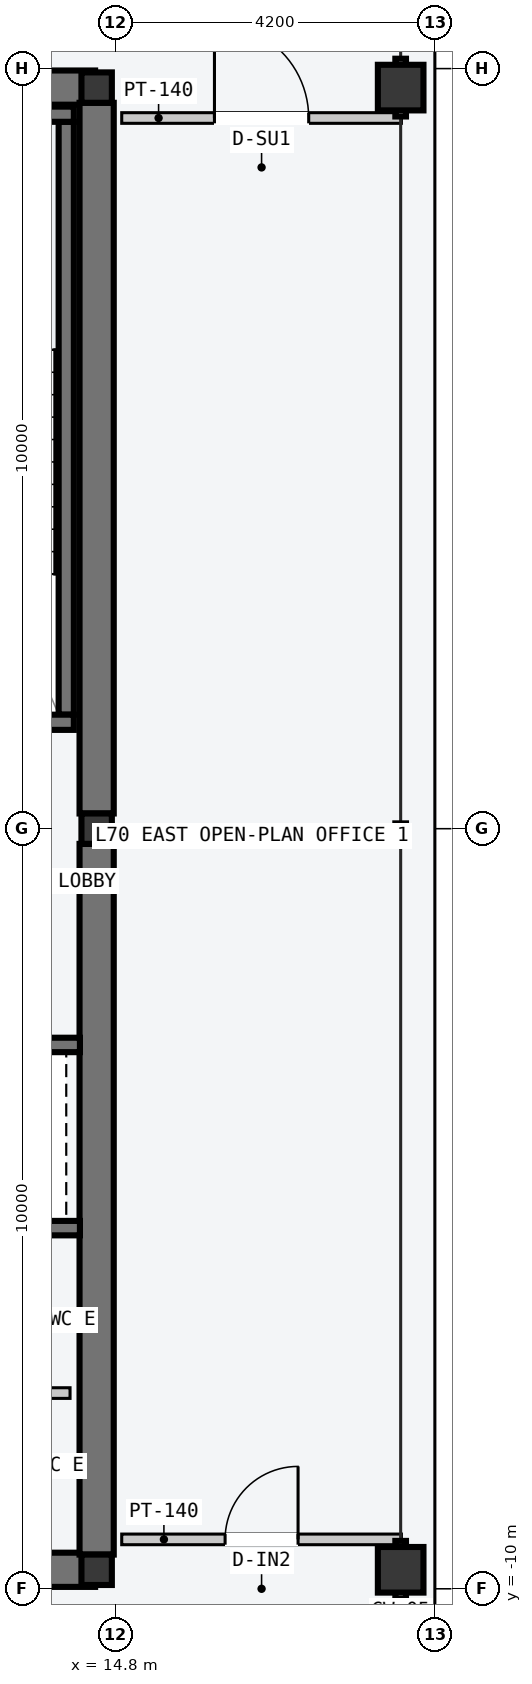
"""IFC4 building model, lengths in metres.
Left out: names, types, materials, properties, quantities, classifications, styles, units other than length and angle.
Written with IfcOpenShell. Run it as: python <this file> out.ifc"""

import sys

from ifc_helpers import new_model, si_unit, direction, frame, frame_2d, origin, origin_2d, place, context, subcontext, project, spatial, rectangle, hollow_rectangle, i_section, extrude, element, fill, save


model = new_model("IFC4")
c1 = context("Model", 3, precision=1e-05, world=origin(), true_north=direction((0.0, 1.0)))
c2 = subcontext(c1, "Body", "Model", "MODEL_VIEW")
j1 = project(units=[si_unit("LENGTHUNIT", "METRE"), si_unit("PLANEANGLEUNIT", "RADIAN")], contexts=[c1])
p1 = place(None, origin())
s1 = spatial("IfcSite", under=j1, at=p1, CompositionType="ELEMENT")
p2 = place(p1, origin())
s2 = spatial("IfcBuilding", under=s1, at=p2, CompositionType="ELEMENT")
p3 = place(p2, frame((0.0, 0.0, 265.2)))
s3 = spatial("IfcBuildingStorey", under=s2, at=p3, CompositionType="ELEMENT", Elevation=265.2)
for number, where, z_axis, x_axis in (
    (1, (8.07, -9.75, -0.2), (0.0, 0.0, 1.0), (1.0, 0.0, 0.0)),
    (2, (8.07, 9.75, -0.2), (0.0, 0.0, 1.0), (1.0, 0.0, 0.0)),
):
    element("IfcWall", number, at=place(p3, frame(where, z_axis=z_axis, x_axis=x_axis)), inside=s3, PredefinedType="SHEAR", context=c2, shape_type="SweptSolid", body=[
        extrude(rectangle(XDim=6.46, YDim=0.45, at=frame_2d((3.23, 0.0))), origin(), (0.0, 0.0, 1.0), 3.6),
    ])
for number, where, z_axis, x_axis in (
    (3, (14.55, -9.55, -0.2), (0.0, 0.0, 1.0), (0.0, 1.0, 0.0)),
    (4, (14.55, 0.2, -0.2), (0.0, 0.0, 1.0), (0.0, 1.0, 0.0)),
):
    element("IfcWall", number, at=place(p3, frame(where, z_axis=z_axis, x_axis=x_axis)), inside=s3, PredefinedType="SHEAR", context=c2, shape_type="SweptSolid", body=[
        extrude(rectangle(XDim=9.35, YDim=0.45, at=frame_2d((4.675, 0.0))), origin(), (0.0, 0.0, 1.0), 3.6),
    ])
p4 = place(p3, frame((14.15, 1.5, -0.2), z_axis=(0.0, 0.0, 1.0), x_axis=(0.0, 1.0, 0.0)))
e5 = element("IfcWall", 5, at=p4, inside=s3, PredefinedType="SOLIDWALL", context=c2, shape_type="SweptSolid", body=[
    extrude(rectangle(XDim=7.8, YDim=0.2, at=frame_2d((3.9, 0.0))), origin(), (0.0, 0.0, 1.0), 3.6),
])
p5 = place(p3, frame((10.53, 1.4, -0.2), z_axis=(0.0, 0.0, 1.0), x_axis=(1.0, 0.0, 0.0)))
e6 = element("IfcWall", 6, at=p5, inside=s3, PredefinedType="SOLIDWALL", context=c2, shape_type="SweptSolid", body=[
    extrude(rectangle(XDim=3.72, YDim=0.2, at=frame_2d((1.86, 0.0))), origin(), (0.0, 0.0, 1.0), 3.6),
])
p6 = place(p5, frame((1.5, 0.0, 0.2)))
e7 = element("IfcOpeningElement", 7, at=p6, cuts=e6, PredefinedType="OPENING", context=c2, shape_type="SweptSolid", body=[
    extrude(rectangle(XDim=1.12, YDim=2.18, at=frame_2d((0.56, 1.09))), frame((0.0, 0.11, 0.0), z_axis=(0.0, -1.0, 0.0), x_axis=(1.0, 0.0, 0.0)), (0.0, 0.0, 1.0), 0.22),
])
p7 = place(p3, frame((10.53, 9.4, -0.2), z_axis=(0.0, 0.0, 1.0), x_axis=(1.0, 0.0, 0.0)))
e8 = element("IfcWall", 8, at=p7, inside=s3, PredefinedType="SOLIDWALL", context=c2, shape_type="SweptSolid", body=[
    extrude(rectangle(XDim=3.72, YDim=0.2, at=frame_2d((1.86, 0.0))), origin(), (0.0, 0.0, 1.0), 3.6),
])
for number, where, z_axis, x_axis in (
    (9, (14.55, -9.75, 0.0), (0.0, 0.0, 1.0), (1.0, 0.0, 0.0)),
    (10, (14.55, 0.0, 0.0), (0.0, 0.0, 1.0), (1.0, 0.0, 0.0)),
    (11, (14.55, 9.75, 0.0), (0.0, 0.0, 1.0), (1.0, 0.0, 0.0)),
):
    element("IfcColumn", number, at=place(p3, frame(where, z_axis=z_axis, x_axis=x_axis)), inside=s3, PredefinedType="COLUMN", context=c2, shape_type="SweptSolid", body=[
        extrude(i_section(OverallWidth=0.4, OverallDepth=0.4, WebThickness=0.013, FlangeThickness=0.021, at=origin_2d()), origin(), (0.0, 0.0, 1.0), 3.6),
    ])
for number, where, z_axis, x_axis in (
    (12, (18.55, -9.75, 0.0), (0.0, 0.0, 1.0), (0.0, 1.0, 0.0)),
    (13, (18.55, 9.75, 0.0), (0.0, 0.0, 1.0), (0.0, 1.0, 0.0)),
):
    element("IfcColumn", number, at=place(p3, frame(where, z_axis=z_axis, x_axis=x_axis)), inside=s3, PredefinedType="COLUMN", context=c2, shape_type="SweptSolid", body=[
        extrude(hollow_rectangle(XDim=0.6, YDim=0.6, WallThickness=0.025, at=origin_2d()), origin(), (0.0, 0.0, 1.0), 3.6),
    ])
p8 = place(p3, frame((11.65, -2.845, -0.2), z_axis=(0.0, 0.0, 1.0), x_axis=(1.0, 0.0, 0.0)))
e14 = element("IfcWall", 14, at=p8, inside=s3, PredefinedType="SOLIDWALL", context=c2, shape_type="SweptSolid", body=[
    extrude(rectangle(XDim=2.68, YDim=0.19, at=frame_2d((1.34, 0.0))), origin(), (0.0, 0.0, 1.0), 3.6),
])
p9 = place(p8, frame((0.65, 0.0, 0.2)))
e15 = element("IfcOpeningElement", 15, at=p9, cuts=e14, PredefinedType="OPENING", context=c2, shape_type="SweptSolid", body=[
    extrude(rectangle(XDim=1.2, YDim=2.2, at=frame_2d((0.6, 1.1))), frame((0.0, 0.105, 0.0), z_axis=(0.0, -1.0, 0.0), x_axis=(1.0, 0.0, 0.0)), (0.0, 0.0, 1.0), 0.21),
])
p10 = place(p3, frame((11.65, -5.255, -0.2), z_axis=(0.0, 0.0, 1.0), x_axis=(1.0, 0.0, 0.0)))
e16 = element("IfcWall", 16, at=p10, inside=s3, PredefinedType="SOLIDWALL", context=c2, shape_type="SweptSolid", body=[
    extrude(rectangle(XDim=2.68, YDim=0.19, at=frame_2d((1.34, 0.0))), origin(), (0.0, 0.0, 1.0), 3.6),
])
p11 = place(p3, frame((11.7, -7.425, 0.0), z_axis=(0.0, 0.0, 1.0), x_axis=(1.0, 0.0, 0.0)))
e17 = element("IfcWall", 17, at=p11, inside=s3, PredefinedType="PARTITIONING", context=c2, shape_type="SweptSolid", body=[
    extrude(rectangle(XDim=2.5, YDim=0.14, at=frame_2d((1.25, 0.0))), origin(), (0.0, 0.0, 1.0), 3.4),
])
p12 = place(p3, frame((14.88, 9.35, 0.0), z_axis=(0.0, 0.0, 1.0), x_axis=(1.0, 0.0, 0.0)))
e18 = element("IfcWall", 18, at=p12, inside=s3, PredefinedType="PARTITIONING", context=c2, shape_type="SweptSolid", body=[
    extrude(rectangle(XDim=3.68, YDim=0.14, at=frame_2d((1.84, 0.0))), origin(), (0.0, 0.0, 1.0), 3.4),
])
p13 = place(p12, frame((1.22, 0.0, 0.0)))
e19 = element("IfcOpeningElement", 19, at=p13, cuts=e18, PredefinedType="OPENING", context=c2, shape_type="SweptSolid", body=[
    extrude(rectangle(XDim=1.24, YDim=2.24, at=frame_2d((0.62, 1.12))), frame((0.0, 0.08, 0.0), z_axis=(0.0, -1.0, 0.0), x_axis=(1.0, 0.0, 0.0)), (0.0, 0.0, 1.0), 0.16),
])
p14 = place(p3, frame((14.88, -9.35, 0.0), z_axis=(0.0, 0.0, 1.0), x_axis=(1.0, 0.0, 0.0)))
e20 = element("IfcWall", 20, at=p14, inside=s3, PredefinedType="PARTITIONING", context=c2, shape_type="SweptSolid", body=[
    extrude(rectangle(XDim=3.68, YDim=0.14, at=frame_2d((1.84, 0.0))), origin(), (0.0, 0.0, 1.0), 3.4),
])
p15 = place(p14, frame((1.36, 0.0, 0.0)))
e21 = element("IfcOpeningElement", 21, at=p15, cuts=e20, PredefinedType="OPENING", context=c2, shape_type="SweptSolid", body=[
    extrude(rectangle(XDim=0.96, YDim=2.18, at=frame_2d((0.48, 1.09))), frame((0.0, 0.08, 0.0), z_axis=(0.0, -1.0, 0.0), x_axis=(1.0, 0.0, 0.0)), (0.0, 0.0, 1.0), 0.16),
])
p16 = place(p13, origin())
e22 = element("IfcDoor", 22, at=p16, inside=s3, OperationType="SINGLE_SWING_LEFT", PredefinedType="DOOR", context=c2, shape_type="SweptSolid", body=[
    extrude(rectangle(XDim=1.24, YDim=2.24, at=frame_2d((0.62, 1.12))), frame((0.0, 0.025, 0.0), z_axis=(0.0, -1.0, 0.0), x_axis=(1.0, 0.0, 0.0)), (0.0, 0.0, 1.0), 0.05),
])
fill(e19, e22)
p17 = place(p15, origin())
e23 = element("IfcDoor", 23, at=p17, inside=s3, OperationType="SINGLE_SWING_RIGHT", PredefinedType="DOOR", context=c2, shape_type="SweptSolid", body=[
    extrude(rectangle(XDim=0.96, YDim=2.18, at=frame_2d((0.48, 1.09))), frame((0.0, 0.025, 0.0), z_axis=(0.0, -1.0, 0.0), x_axis=(1.0, 0.0, 0.0)), (0.0, 0.0, 1.0), 0.05),
])
fill(e21, e23)
save(model, sys.argv[1])
